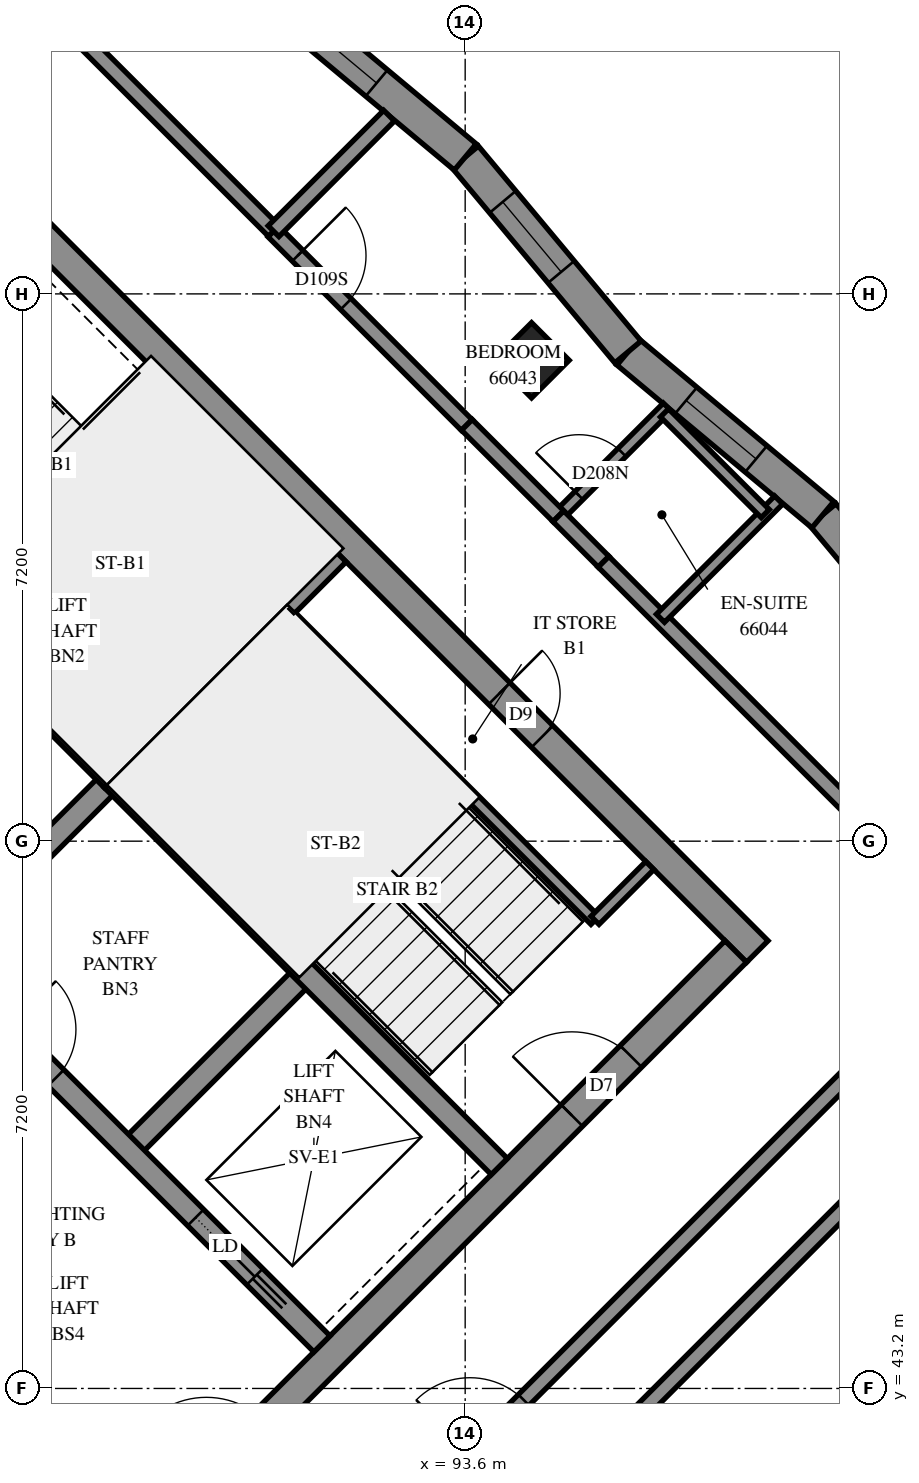
"""IFC4 building model, lengths in metres.
Left out: names, types, materials, properties, quantities, classifications, styles, units other than length and angle.
Written with IfcOpenShell. Run it as: python <this file> out.ifc"""

import sys

from ifc_helpers import new_model, si_unit, direction, frame, frame_2d, origin, origin_2d, place, context, subcontext, project, spatial, polyline, rectangle, outline, extrude, element, fill, save


model = new_model("IFC4")
c1 = context("Model", 3, precision=1e-05, world=origin(), true_north=direction((0.0, 1.0)))
c2 = subcontext(c1, "Body", "Model", "MODEL_VIEW")
j1 = project(units=[si_unit("LENGTHUNIT", "METRE"), si_unit("PLANEANGLEUNIT", "RADIAN")], contexts=[c1])
p1 = place(None, origin())
s1 = spatial("IfcSite", under=j1, at=p1, CompositionType="ELEMENT")
p2 = place(p1, origin())
s2 = spatial("IfcBuilding", under=s1, at=p2, CompositionType="ELEMENT")
p3 = place(p2, frame((0.0, 0.0, 243.8)))
s3 = spatial("IfcBuildingStorey", under=s2, at=p3, CompositionType="ELEMENT", Elevation=243.8)
p4 = place(p3, frame((94.474, 56.727, 0.0), z_axis=(0.0, 0.0, 1.0), x_axis=(0.7071067812, -0.7071067812, 0.0)))
e1 = element("IfcColumn", 1, at=p4, inside=s3, PredefinedType="COLUMN", context=c2, shape_type="SweptSolid", body=[
    extrude(rectangle(XDim=0.7, YDim=0.7, at=origin_2d()), origin(), (0.0, 0.0, 1.0), 3.1),
])
p5 = place(p3, frame((86.695, 59.696, -0.3), z_axis=(0.0, 0.0, 1.0), x_axis=(0.7071100706, -0.7071034917, 0.0)))
e2 = element("IfcWall", 2, at=p5, inside=s3, PredefinedType="SHEAR", context=c2, shape_type="SweptSolid", body=[
    extrude(rectangle(XDim=15.2, YDim=0.4, at=frame_2d((7.6, 0.0))), origin(), (0.0, 0.0, 1.0), 2.7),
])
p6 = place(p5, frame((10.4, 0.0, 0.3)))
e3 = element("IfcOpeningElement", 3, at=p6, cuts=e2, PredefinedType="OPENING", context=c2, shape_type="SweptSolid", body=[
    extrude(rectangle(XDim=0.8, YDim=2.1, at=frame_2d((0.4, 1.05))), frame((0.0, 0.21, 0.0), z_axis=(0.0, -1.0, 0.0), x_axis=(1.0, 0.0, 0.0)), (0.0, 0.0, 1.0), 0.42),
])
p7 = place(p3, frame((86.978, 38.766, -0.3), z_axis=(0.0, 0.0, 1.0), x_axis=(0.7071067812, 0.7071067812, 0.0)))
e4 = element("IfcWall", 4, at=p7, inside=s3, PredefinedType="SHEAR", context=c2, shape_type="SweptSolid", body=[
    extrude(rectangle(XDim=14.4, YDim=0.4, at=frame_2d((7.2, 0.0))), origin(), (0.0, 0.0, 1.0), 2.7),
])
p8 = place(p7, frame((4.55, 0.0, 0.3)))
e5 = element("IfcOpeningElement", 5, at=p8, cuts=e4, PredefinedType="OPENING", context=c2, shape_type="SweptSolid", body=[
    extrude(rectangle(XDim=1.1, YDim=2.1, at=frame_2d((0.55, 1.05))), frame((0.0, 0.21, 0.0), z_axis=(0.0, -1.0, 0.0), x_axis=(1.0, 0.0, 0.0)), (0.0, 0.0, 1.0), 0.42),
])
p9 = place(p7, frame((11.35, 0.0, 0.3)))
e6 = element("IfcOpeningElement", 6, at=p9, cuts=e4, PredefinedType="OPENING", context=c2, shape_type="SweptSolid", body=[
    extrude(rectangle(XDim=1.1, YDim=2.1, at=frame_2d((0.55, 1.05))), frame((0.0, 0.21, 0.0), z_axis=(0.0, -1.0, 0.0), x_axis=(1.0, 0.0, 0.0)), (0.0, 0.0, 1.0), 0.42),
])
for number, where, z_axis, x_axis in (
    (7, (86.625, 48.878, 0.0), (0.0, 0.0, 1.0), (0.707, 0.707, 0.0)),
    (8, (89.17, 46.332, 0.0), (0.0, 0.0, 1.0), (0.707, 0.707, 0.0)),
):
    element("IfcWall", number, at=place(p3, frame(where, z_axis=z_axis, x_axis=x_axis)), inside=s3, PredefinedType="SOLIDWALL", context=c2, shape_type="SweptSolid", body=[
        extrude(rectangle(XDim=3.3, YDim=0.3, at=frame_2d((1.65, 0.0))), origin(), (0.0, 0.0, 1.0), 3.1),
    ])
p10 = place(p3, frame((78.988, 51.423, 0.0), z_axis=(0.0, 0.0, 1.0), x_axis=(0.7071067812, -0.7071067812, 0.0)))
e9 = element("IfcWall", 9, at=p10, inside=s3, PredefinedType="SOLIDWALL", context=c2, shape_type="SweptSolid", body=[
    extrude(rectangle(XDim=14.4, YDim=0.3, at=frame_2d((7.2, 0.0))), origin(), (0.0, 0.0, 1.0), 3.1),
])
p11 = place(p10, frame((1.35, 0.0, 0.0)))
e10 = element("IfcOpeningElement", 10, at=p11, cuts=e9, PredefinedType="OPENING", context=c2, shape_type="SweptSolid", body=[
    extrude(rectangle(XDim=0.9, YDim=2.1, at=frame_2d((0.45, 1.05))), frame((0.0, 0.16, 0.0), z_axis=(0.0, -1.0, 0.0), x_axis=(1.0, 0.0, 0.0)), (0.0, 0.0, 1.0), 0.32),
])
p12 = place(p10, frame((4.95, 0.0, 0.0)))
e11 = element("IfcOpeningElement", 11, at=p12, cuts=e9, PredefinedType="OPENING", context=c2, shape_type="SweptSolid", body=[
    extrude(rectangle(XDim=0.9, YDim=2.1, at=frame_2d((0.45, 1.05))), frame((0.0, 0.16, 0.0), z_axis=(0.0, -1.0, 0.0), x_axis=(1.0, 0.0, 0.0)), (0.0, 0.0, 1.0), 0.32),
])
p13 = place(p10, frame((8.55, 0.0, 0.0)))
e12 = element("IfcOpeningElement", 12, at=p13, cuts=e9, PredefinedType="OPENING", context=c2, shape_type="SweptSolid", body=[
    extrude(rectangle(XDim=0.9, YDim=2.1, at=frame_2d((0.45, 1.05))), frame((0.0, 0.16, 0.0), z_axis=(0.0, -1.0, 0.0), x_axis=(1.0, 0.0, 0.0)), (0.0, 0.0, 1.0), 0.32),
])
p14 = place(p10, frame((12.05, 0.0, 0.0)))
e13 = element("IfcOpeningElement", 13, at=p14, cuts=e9, PredefinedType="OPENING", context=c2, shape_type="SweptSolid", body=[
    extrude(rectangle(XDim=1.1, YDim=2.1, at=frame_2d((0.55, 1.05))), frame((0.0, 0.16, 0.0), z_axis=(0.0, -1.0, 0.0), x_axis=(1.0, 0.0, 0.0)), (0.0, 0.0, 1.0), 0.32),
])
p15 = place(p3, frame((81.534, 53.969, 0.0), z_axis=(0.0, 0.0, 1.0), x_axis=(0.707103309, -0.7071102534, 0.0)))
e14 = element("IfcWall", 14, at=p15, inside=s3, PredefinedType="SOLIDWALL", context=c2, shape_type="SweptSolid", body=[
    extrude(rectangle(XDim=14.4, YDim=0.3, at=frame_2d((7.2, 0.0))), origin(), (0.0, 0.0, 1.0), 3.1),
])
p16 = place(p15, frame((8.55, 0.0, 0.0)))
e15 = element("IfcOpeningElement", 15, at=p16, cuts=e14, PredefinedType="OPENING", context=c2, shape_type="SweptSolid", body=[
    extrude(rectangle(XDim=0.9, YDim=2.1, at=frame_2d((0.45, 1.05))), frame((0.0, 0.16, 0.0), z_axis=(0.0, -1.0, 0.0), x_axis=(1.0, 0.0, 0.0)), (0.0, 0.0, 1.0), 0.32),
])
p17 = place(p15, frame((1.25, 0.0, 0.0)))
e16 = element("IfcOpeningElement", 16, at=p17, cuts=e14, PredefinedType="OPENING", context=c2, shape_type="SweptSolid", body=[
    extrude(rectangle(XDim=1.1, YDim=2.1, at=frame_2d((0.55, 1.05))), frame((0.0, 0.16, 0.0), z_axis=(0.0, -1.0, 0.0), x_axis=(1.0, 0.0, 0.0)), (0.0, 0.0, 1.0), 0.32),
])
p18 = place(p15, frame((4.85, 0.0, 0.0)))
e17 = element("IfcOpeningElement", 17, at=p18, cuts=e14, PredefinedType="OPENING", context=c2, shape_type="SweptSolid", body=[
    extrude(rectangle(XDim=1.1, YDim=2.1, at=frame_2d((0.55, 1.05))), frame((0.0, 0.16, 0.0), z_axis=(0.0, -1.0, 0.0), x_axis=(1.0, 0.0, 0.0)), (0.0, 0.0, 1.0), 0.32),
])
p19 = place(p15, frame((12.05, 0.0, 0.0)))
e18 = element("IfcOpeningElement", 18, at=p19, cuts=e14, PredefinedType="OPENING", context=c2, shape_type="SweptSolid", body=[
    extrude(rectangle(XDim=1.1, YDim=2.1, at=frame_2d((0.55, 1.05))), frame((0.0, 0.16, 0.0), z_axis=(0.0, -1.0, 0.0), x_axis=(1.0, 0.0, 0.0)), (0.0, 0.0, 1.0), 0.32),
])
for number, where, z_axis, x_axis in (
    (19, (83.867, 56.302, 0.0), (0.0, 0.0, 1.0), (0.707, -0.707, 0.0)),
    (20, (88.958, 51.211, 0.0), (0.0, 0.0, 1.0), (0.707, -0.707, 0.0)),
):
    element("IfcWall", number, at=place(p3, frame(where, z_axis=z_axis, x_axis=x_axis)), inside=s3, PredefinedType="SOLIDWALL", context=c2, shape_type="SweptSolid", body=[
        extrude(rectangle(XDim=7.2, YDim=0.3, at=frame_2d((3.6, 0.0))), origin(), (0.0, 0.0, 1.0), 3.1),
    ])
p20 = place(p3, frame((88.958, 51.211, 0.0), z_axis=(0.0, 0.0, 1.0), x_axis=(0.7071067812, 0.7071067812, 0.0)))
e21 = element("IfcWall", 21, at=p20, inside=s3, PredefinedType="SOLIDWALL", context=c2, shape_type="SweptSolid", body=[
    extrude(rectangle(XDim=4.2, YDim=0.3, at=frame_2d((2.1, 0.0))), origin(), (0.0, 0.0, 1.0), 3.1),
])
p21 = place(p3, frame((100.459, 52.116, 0.0), z_axis=(0.0, 0.0, 1.0), x_axis=(-0.640760852, 0.767740536, 0.0)))
e22 = element("IfcWall", 22, at=p21, inside=s3, PredefinedType="SOLIDWALL", context=c2, shape_type="SweptSolid", body=[
    extrude(outline(polyline([(0.04, -0.225), (3.381, -0.225), (3.34, 0.225), (-0.04, 0.225), (0.04, -0.225)])), origin(), (0.0, 0.0, 1.0), 3.1),
])
p22 = place(p21, frame((1.07, 0.0, 0.45)))
e23 = element("IfcOpeningElement", 23, at=p22, cuts=e22, PredefinedType="OPENING", context=c2, shape_type="SweptSolid", body=[
    extrude(rectangle(XDim=1.2, YDim=2.55, at=frame_2d((0.6, 1.275))), frame((0.0, 0.235, 0.0), z_axis=(0.0, -1.0, 0.0), x_axis=(1.0, 0.0, 0.0)), (0.0, 0.0, 1.0), 0.47),
])
p23 = place(p3, frame((98.306, 54.696, 0.0), z_axis=(0.0, 0.0, 1.0), x_axis=(-0.7677450318, 0.6407554652, 0.0)))
e24 = element("IfcWall", 24, at=p23, inside=s3, PredefinedType="SOLIDWALL", context=c2, shape_type="SweptSolid", body=[
    extrude(outline(polyline([(-0.02, -0.225), (3.32, -0.225), (3.361, 0.225), (0.02, 0.225), (-0.02, -0.225)])), origin(), (0.0, 0.0, 1.0), 3.1),
])
p24 = place(p23, frame((1.144, 0.0, 0.45)))
e25 = element("IfcOpeningElement", 25, at=p24, cuts=e24, PredefinedType="OPENING", context=c2, shape_type="SweptSolid", body=[
    extrude(rectangle(XDim=1.2, YDim=2.55, at=frame_2d((0.6, 1.275))), frame((0.0, 0.235, 0.0), z_axis=(0.0, -1.0, 0.0), x_axis=(1.0, 0.0, 0.0)), (0.0, 0.0, 1.0), 0.47),
])
p25 = place(p3, frame((95.742, 56.836, 0.0), z_axis=(0.0, 0.0, 1.0), x_axis=(-0.6407407387, 0.7677573222, 0.0)))
e26 = element("IfcWall", 26, at=p25, inside=s3, PredefinedType="SOLIDWALL", context=c2, shape_type="SweptSolid", body=[
    extrude(outline(polyline([(0.02, -0.225), (3.361, -0.225), (3.32, 0.225), (-0.02, 0.225), (0.02, -0.225)])), origin(), (0.0, 0.0, 1.0), 3.1),
])
p26 = place(p25, frame((1.371, 0.0, 0.45)))
e27 = element("IfcOpeningElement", 27, at=p26, cuts=e26, PredefinedType="OPENING", context=c2, shape_type="SweptSolid", body=[
    extrude(rectangle(XDim=1.2, YDim=2.55, at=frame_2d((0.6, 1.275))), frame((0.0, 0.235, 0.0), z_axis=(0.0, -1.0, 0.0), x_axis=(1.0, 0.0, 0.0)), (0.0, 0.0, 1.0), 0.47),
])
p27 = place(p3, frame((93.601, 59.401, 0.0), z_axis=(0.0, 0.0, 1.0), x_axis=(-0.7677573222, 0.6407407387, 0.0)))
e28 = element("IfcWall", 28, at=p27, inside=s3, PredefinedType="SOLIDWALL", context=c2, shape_type="SweptSolid", body=[
    extrude(outline(polyline([(-0.02, -0.225), (3.32, -0.225), (3.361, 0.225), (0.02, 0.225), (-0.02, -0.225)])), origin(), (0.0, 0.0, 1.0), 3.1),
])
p28 = place(p27, frame((1.518, 0.0, 0.45)))
e29 = element("IfcOpeningElement", 29, at=p28, cuts=e28, PredefinedType="OPENING", context=c2, shape_type="SweptSolid", body=[
    extrude(rectangle(XDim=1.2, YDim=2.55, at=frame_2d((0.6, 1.275))), frame((0.0, 0.235, 0.0), z_axis=(0.0, -1.0, 0.0), x_axis=(1.0, 0.0, 0.0)), (0.0, 0.0, 1.0), 0.47),
])
p29 = place(p3, frame((91.313, 53.354, 0.0), z_axis=(0.0, 0.0, 1.0), x_axis=(0.7071067812, -0.7071067812, 0.0)))
e30 = element("IfcWall", 30, at=p29, inside=s3, PredefinedType="PARTITIONING", context=c2, shape_type="SweptSolid", body=[
    extrude(rectangle(XDim=5.65, YDim=0.15, at=frame_2d((2.825, 0.0))), origin(), (0.0, 0.0, 1.0), 3.1),
])
p30 = place(p3, frame((95.308, 49.358, 0.0), z_axis=(0.0, 0.0, 1.0), x_axis=(0.70705776, 0.707155799, 0.0)))
e31 = element("IfcWall", 31, at=p30, inside=s3, PredefinedType="PARTITIONING", context=c2, shape_type="SweptSolid", body=[
    extrude(rectangle(XDim=1.02, YDim=0.15, at=frame_2d((0.51, 0.0))), origin(), (0.0, 0.0, 1.0), 3.1),
])
p31 = place(p3, frame((93.483, 42.161, 0.0), z_axis=(0.0, 0.0, 1.0), x_axis=(0.7071067812, 0.7071067812, 0.0)))
e32 = element("IfcWall", 32, at=p31, inside=s3, PredefinedType="PARTITIONING", context=c2, shape_type="SweptSolid", body=[
    extrude(rectangle(XDim=9.8, YDim=0.2, at=frame_2d((4.9, 0.0))), origin(), (0.0, 0.0, 1.0), 3.1),
])
p32 = place(p31, frame((0.255, 0.0, 0.0)))
e33 = element("IfcOpeningElement", 33, at=p32, cuts=e32, PredefinedType="OPENING", context=c2, shape_type="SweptSolid", body=[
    extrude(rectangle(XDim=1.0, YDim=2.1, at=frame_2d((0.5, 1.05))), frame((0.0, 0.11, 0.0), z_axis=(0.0, -1.0, 0.0), x_axis=(1.0, 0.0, 0.0)), (0.0, 0.0, 1.0), 0.22),
])
p33 = place(p3, frame((95.419, 54.077, 0.0), z_axis=(0.0, 0.0, 1.0), x_axis=(0.7071067812, -0.7071067812, 0.0)))
e34 = element("IfcWall", 34, at=p33, inside=s3, PredefinedType="PARTITIONING", context=c2, shape_type="SweptSolid", body=[
    extrude(rectangle(XDim=7.057, YDim=0.2, at=frame_2d((3.528, 0.0))), origin(), (0.0, 0.0, 1.0), 3.1),
])
p34 = place(p3, frame((94.331, 41.313, 0.0), z_axis=(0.0, 0.0, 1.0), x_axis=(0.7071139756, 0.7070995867, 0.0)))
e35 = element("IfcWall", 35, at=p34, inside=s3, PredefinedType="PARTITIONING", context=c2, shape_type="SweptSolid", body=[
    extrude(rectangle(XDim=6.95, YDim=0.2, at=frame_2d((3.475, 0.0))), origin(), (0.0, 0.0, 1.0), 3.1),
])
p35 = place(p3, frame((86.841, 62.669, 0.0), z_axis=(0.0, 0.0, 1.0), x_axis=(0.7071067812, -0.7071067812, 0.0)))
e36 = element("IfcWall", 36, at=p35, inside=s3, PredefinedType="PARTITIONING", context=c2, shape_type="SweptSolid", body=[
    extrude(rectangle(XDim=5.999, YDim=0.2, at=frame_2d((3.0, 0.0))), origin(), (0.0, 0.0, 1.0), 3.1),
])
p36 = place(p3, frame((91.077, 58.421, 0.0), z_axis=(0.0, 0.0, 1.0), x_axis=(0.7068288851, -0.7073845681, 0.0)))
e37 = element("IfcWall", 37, at=p36, inside=s3, PredefinedType="PARTITIONING", context=c2, shape_type="SweptSolid", body=[
    extrude(rectangle(XDim=3.599, YDim=0.2, at=frame_2d((1.8, 0.0))), origin(), (0.0, 0.0, 1.0), 3.1),
])
p37 = place(p36, frame((0.451, 0.0, 0.0)))
e38 = element("IfcOpeningElement", 38, at=p37, cuts=e37, PredefinedType="OPENING", context=c2, shape_type="SweptSolid", body=[
    extrude(rectangle(XDim=0.9, YDim=2.1, at=frame_2d((0.45, 1.05))), frame((0.0, 0.11, 0.0), z_axis=(0.0, -1.0, 0.0), x_axis=(1.0, 0.0, 0.0)), (0.0, 0.0, 1.0), 0.22),
])
p38 = place(p3, frame((96.169, 53.333, 0.0), z_axis=(0.0, 0.0, 1.0), x_axis=(0.7071067812, 0.7071067812, 0.0)))
e39 = element("IfcWall", 39, at=p38, inside=s3, PredefinedType="PARTITIONING", context=c2, shape_type="SweptSolid", body=[
    extrude(rectangle(XDim=2.2, YDim=0.15, at=frame_2d((1.1, 0.0))), origin(), (0.0, 0.0, 1.0), 3.1),
])
p39 = place(p3, frame((91.079, 58.425, 0.0), z_axis=(0.0, 0.0, 1.0), x_axis=(0.7071067812, 0.7071067812, 0.0)))
e40 = element("IfcWall", 40, at=p39, inside=s3, PredefinedType="PARTITIONING", context=c2, shape_type="SweptSolid", body=[
    extrude(rectangle(XDim=2.149, YDim=0.2, at=frame_2d((1.074, 0.0))), origin(), (0.0, 0.0, 1.0), 3.1),
])
p40 = place(p3, frame((94.827, 54.677, 0.0), z_axis=(0.0, 0.0, 1.0), x_axis=(0.7070821111, 0.7071314504, 0.0)))
e41 = element("IfcWall", 41, at=p40, inside=s3, PredefinedType="PARTITIONING", context=c2, shape_type="SweptSolid", body=[
    extrude(rectangle(XDim=2.027, YDim=0.15, at=frame_2d((1.013, 0.0))), origin(), (0.0, 0.0, 1.0), 3.1),
])
p41 = place(p40, frame((0.383, 0.0, 0.0)))
e42 = element("IfcOpeningElement", 42, at=p41, cuts=e41, PredefinedType="OPENING", context=c2, shape_type="SweptSolid", body=[
    extrude(rectangle(XDim=0.8, YDim=2.1, at=frame_2d((0.4, 1.05))), frame((0.0, 0.085, 0.0), z_axis=(0.0, -1.0, 0.0), x_axis=(1.0, 0.0, 0.0)), (0.0, 0.0, 1.0), 0.17),
])
p42 = place(p3, frame((96.222, 56.034, 0.0), z_axis=(0.0, 0.0, 1.0), x_axis=(0.7076402451, -0.7065729145, 0.0)))
e43 = element("IfcWall", 43, at=p42, inside=s3, PredefinedType="PARTITIONING", context=c2, shape_type="SweptSolid", body=[
    extrude(rectangle(XDim=1.874, YDim=0.15, at=frame_2d((0.937, 0.0))), origin(), (0.0, 0.0, 1.0), 3.1),
])
p43 = place(p3, frame((93.623, 55.877, 0.0), z_axis=(0.0, 0.0, 1.0), x_axis=(0.7076943229, -0.7065187509, 0.0)))
e44 = element("IfcWall", 44, at=p43, inside=s3, PredefinedType="PARTITIONING", context=c2, shape_type="SweptSolid", body=[
    extrude(rectangle(XDim=1.701, YDim=0.2, at=frame_2d((0.851, 0.0))), origin(), (0.0, 0.0, 1.0), 3.1),
])
p44 = place(p3, frame((94.826, 54.674, 0.0), z_axis=(0.0, 0.0, 1.0), x_axis=(0.7059173694, -0.7082941956, 0.0)))
e45 = element("IfcWall", 45, at=p44, inside=s3, PredefinedType="PARTITIONING", context=c2, shape_type="SweptSolid", body=[
    extrude(rectangle(XDim=0.842, YDim=0.2, at=frame_2d((0.421, 0.0))), origin(), (0.0, 0.0, 1.0), 3.1),
])
p45 = place(p24, origin())
e46 = element("IfcWindow", 46, at=p45, inside=s3, PartitioningType="SINGLE_PANEL", PredefinedType="WINDOW", context=c2, shape_type="SweptSolid", body=[
    extrude(rectangle(XDim=1.2, YDim=2.55, at=frame_2d((0.6, 1.275))), frame((0.0, 0.205, 0.0), z_axis=(0.0, -1.0, 0.0), x_axis=(1.0, 0.0, 0.0)), (0.0, 0.0, 1.0), 0.06),
])
fill(e25, e46)
p46 = place(p26, origin())
e47 = element("IfcWindow", 47, at=p46, inside=s3, PartitioningType="SINGLE_PANEL", PredefinedType="WINDOW", context=c2, shape_type="SweptSolid", body=[
    extrude(rectangle(XDim=1.2, YDim=2.55, at=frame_2d((0.6, 1.275))), frame((0.0, 0.205, 0.0), z_axis=(0.0, -1.0, 0.0), x_axis=(1.0, 0.0, 0.0)), (0.0, 0.0, 1.0), 0.06),
])
fill(e27, e47)
p47 = place(p28, origin())
e48 = element("IfcWindow", 48, at=p47, inside=s3, PartitioningType="SINGLE_PANEL", PredefinedType="WINDOW", context=c2, shape_type="SweptSolid", body=[
    extrude(rectangle(XDim=1.2, YDim=2.55, at=frame_2d((0.6, 1.275))), frame((0.0, 0.205, 0.0), z_axis=(0.0, -1.0, 0.0), x_axis=(1.0, 0.0, 0.0)), (0.0, 0.0, 1.0), 0.06),
])
fill(e29, e48)
p48 = place(p6, origin())
e49 = element("IfcDoor", 49, at=p48, inside=s3, OperationType="SINGLE_SWING_RIGHT", PredefinedType="DOOR", context=c2, shape_type="SweptSolid", body=[
    extrude(rectangle(XDim=0.8, YDim=2.1, at=frame_2d((0.4, 1.05))), frame((0.0, 0.025, 0.0), z_axis=(0.0, -1.0, 0.0), x_axis=(1.0, 0.0, 0.0)), (0.0, 0.0, 1.0), 0.05),
])
fill(e3, e49)
p49 = place(p9, origin())
e50 = element("IfcDoor", 50, at=p49, inside=s3, OperationType="SINGLE_SWING_RIGHT", PredefinedType="DOOR", context=c2, shape_type="SweptSolid", body=[
    extrude(rectangle(XDim=1.1, YDim=2.1, at=frame_2d((0.55, 1.05))), frame((0.0, 0.025, 0.0), z_axis=(0.0, -1.0, 0.0), x_axis=(1.0, 0.0, 0.0)), (0.0, 0.0, 1.0), 0.05),
])
fill(e6, e50)
p50 = place(p16, origin())
e51 = element("IfcDoor", 51, at=p50, inside=s3, OperationType="SINGLE_SWING_LEFT", PredefinedType="DOOR", context=c2, shape_type="SweptSolid", body=[
    extrude(rectangle(XDim=0.9, YDim=2.1, at=frame_2d((0.45, 1.05))), frame((0.0, 0.025, 0.0), z_axis=(0.0, -1.0, 0.0), x_axis=(1.0, 0.0, 0.0)), (0.0, 0.0, 1.0), 0.05),
])
fill(e15, e51)
p51 = place(p19, origin())
e52 = element("IfcDoor", 52, at=p51, inside=s3, OperationType="SLIDING_TO_RIGHT", PredefinedType="DOOR", context=c2, shape_type="SweptSolid", body=[
    extrude(rectangle(XDim=1.1, YDim=2.1, at=frame_2d((0.55, 1.05))), frame((0.0, 0.025, 0.0), z_axis=(0.0, -1.0, 0.0), x_axis=(1.0, 0.0, 0.0)), (0.0, 0.0, 1.0), 0.05),
])
fill(e18, e52)
p52 = place(p32, origin())
e53 = element("IfcDoor", 53, at=p52, inside=s3, OperationType="SINGLE_SWING_RIGHT", PredefinedType="DOOR", context=c2, shape_type="SweptSolid", body=[
    extrude(rectangle(XDim=1.0, YDim=2.1, at=frame_2d((0.5, 1.05))), frame((0.0, 0.025, 0.0), z_axis=(0.0, -1.0, 0.0), x_axis=(1.0, 0.0, 0.0)), (0.0, 0.0, 1.0), 0.05),
])
fill(e33, e53)
p53 = place(p37, origin())
e54 = element("IfcDoor", 54, at=p53, inside=s3, OperationType="SINGLE_SWING_RIGHT", PredefinedType="DOOR", context=c2, shape_type="SweptSolid", body=[
    extrude(rectangle(XDim=0.9, YDim=2.1, at=frame_2d((0.45, 1.05))), frame((0.0, 0.025, 0.0), z_axis=(0.0, -1.0, 0.0), x_axis=(1.0, 0.0, 0.0)), (0.0, 0.0, 1.0), 0.05),
])
fill(e38, e54)
p54 = place(p41, origin())
e55 = element("IfcDoor", 55, at=p54, inside=s3, OperationType="SINGLE_SWING_RIGHT", PredefinedType="DOOR", context=c2, shape_type="SweptSolid", body=[
    extrude(rectangle(XDim=0.8, YDim=2.1, at=frame_2d((0.4, 1.05))), frame((0.0, 0.025, 0.0), z_axis=(0.0, -1.0, 0.0), x_axis=(1.0, 0.0, 0.0)), (0.0, 0.0, 1.0), 0.05),
])
fill(e42, e55)
save(model, sys.argv[1])
